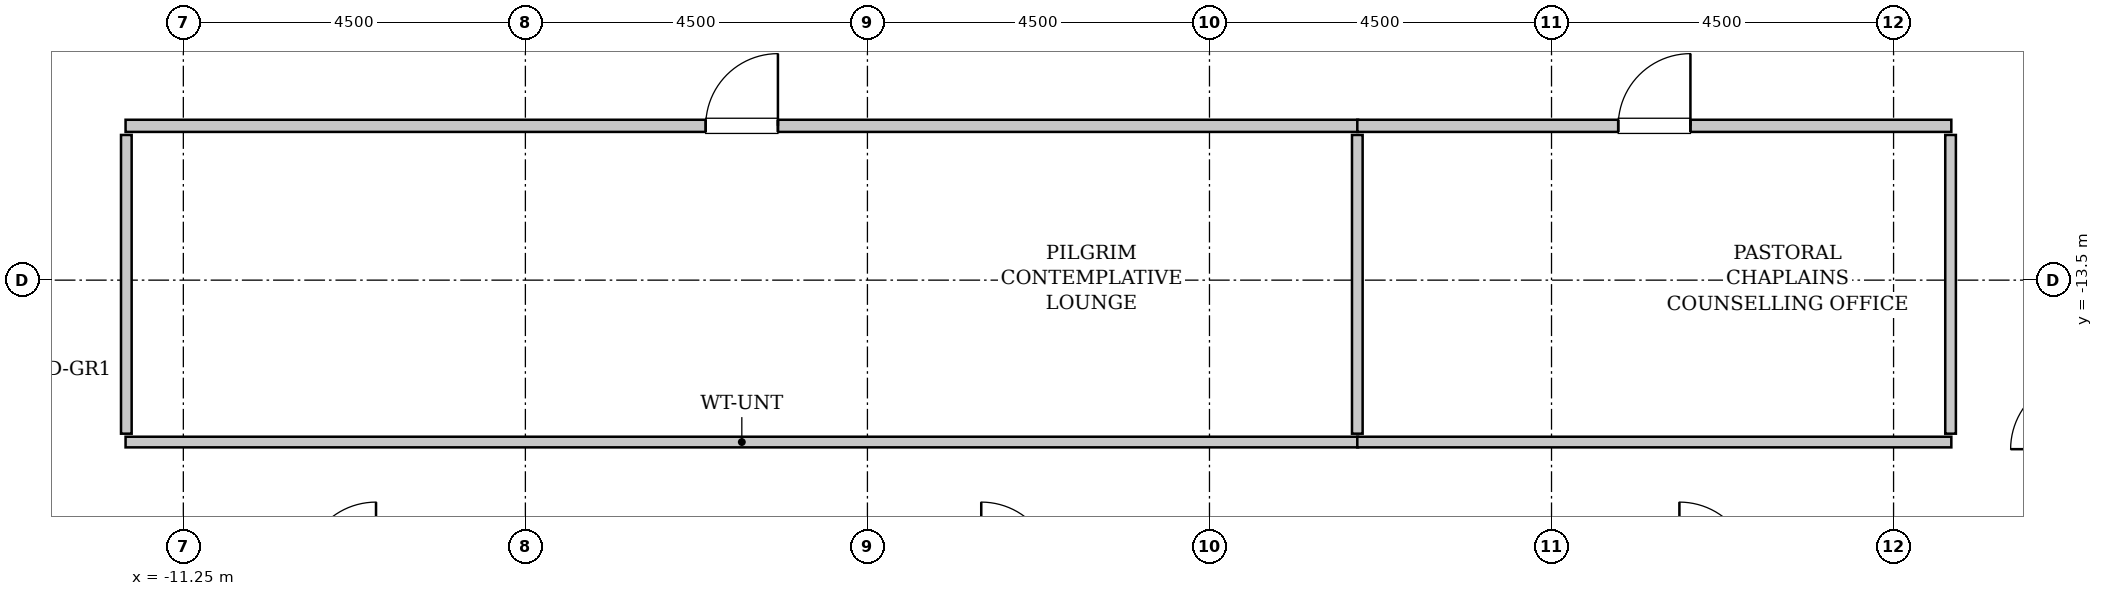
"""IFC4 building model, lengths in metres.
Left out: names, types, materials, properties, quantities, classifications, styles, units other than length and angle.
Written with IfcOpenShell. Run it as: python <this file> out.ifc"""

import sys

from ifc_helpers import new_model, si_unit, direction, frame, frame_2d, origin, place, context, subcontext, project, spatial, rectangle, extrude, source, transform, mapped, element, fill, save


model = new_model("IFC4")
c1 = context("Model", 3, precision=1e-05, world=origin(), true_north=direction((0.0, 1.0)))
c2 = subcontext(c1, "Body", "Model", "MODEL_VIEW")
j1 = project(units=[si_unit("LENGTHUNIT", "METRE"), si_unit("PLANEANGLEUNIT", "RADIAN")], contexts=[c1])
p1 = place(None, origin())
s1 = spatial("IfcSite", under=j1, at=p1, CompositionType="ELEMENT")
p2 = place(p1, origin())
s2 = spatial("IfcBuilding", under=s1, at=p2, CompositionType="ELEMENT")
p3 = place(p2, frame((0.0, 0.0, 225.6)))
s3 = spatial("IfcBuildingStorey", under=s2, at=p3, CompositionType="ELEMENT", Elevation=225.6)
m1 = source(origin(), c2, "Body", "SweptSolid", [
    extrude(rectangle(XDim=16.215, YDim=0.16, at=frame_2d((8.107, 0.0))), origin(), (0.0, 0.0, 1.0), 3.535),
])
p4 = place(p3, frame((-12.01, -11.47, 0.0), z_axis=(0.0, 0.0, 1.0), x_axis=(1.0, 0.0, 0.0)))
e1 = element("IfcWall", 1, at=p4, inside=s3, PredefinedType="PARTITIONING", context=c2, shape_type="MappedRepresentation", body=[
    mapped(m1, transform((0.0, 0.0, 0.0), x_axis=(1.0, 0.0, 0.0), y_axis=(0.0, 1.0, 0.0), z_axis=(0.0, 0.0, 1.0), scale=1.0)),
])
p5 = place(p4, frame((7.633, 0.0, 0.0)))
e2 = element("IfcOpeningElement", 2, at=p5, cuts=e1, PredefinedType="OPENING", context=c2, shape_type="SweptSolid", body=[
    extrude(rectangle(XDim=0.95, YDim=2.1, at=frame_2d((0.475, 1.05))), frame((0.0, 0.09, 0.0), z_axis=(0.0, -1.0, 0.0), x_axis=(1.0, 0.0, 0.0)), (0.0, 0.0, 1.0), 0.18),
])
m2 = source(origin(), c2, "Body", "SweptSolid", [
    extrude(rectangle(XDim=16.215, YDim=0.14, at=frame_2d((8.107, 0.0))), origin(), (0.0, 0.0, 1.0), 3.535),
])
p6 = place(p3, frame((-12.01, -15.63, 0.0), z_axis=(0.0, 0.0, 1.0), x_axis=(1.0, 0.0, 0.0)))
e3 = element("IfcWall", 3, at=p6, inside=s3, PredefinedType="PARTITIONING", context=c2, shape_type="MappedRepresentation", body=[
    mapped(m2, transform((0.0, 0.0, 0.0), x_axis=(1.0, 0.0, 0.0), y_axis=(0.0, 1.0, 0.0), z_axis=(0.0, 0.0, 1.0), scale=1.0)),
])
m3 = source(origin(), c2, "Body", "SweptSolid", [
    extrude(rectangle(XDim=3.93, YDim=0.14, at=frame_2d((1.965, 0.0))), origin(), (0.0, 0.0, 1.0), 3.535),
])
for number, where, z_axis, x_axis in (
    (4, (-12.0, -15.52, 0.0), (0.0, 0.0, 1.0), (0.0, 1.0, 0.0)),
    (5, (4.195, -15.52, 0.0), (0.0, 0.0, 1.0), (0.0, 1.0, 0.0)),
):
    element("IfcWall", number, at=place(p3, frame(where, z_axis=z_axis, x_axis=x_axis)), inside=s3, PredefinedType="PARTITIONING", context=c2, shape_type="MappedRepresentation", body=[
        mapped(m3, transform((0.0, 0.0, 0.0), x_axis=(1.0, 0.0, 0.0), y_axis=(0.0, 1.0, 0.0), z_axis=(0.0, 0.0, 1.0), scale=1.0)),
    ])
m4 = source(origin(), c2, "Body", "SweptSolid", [
    extrude(rectangle(XDim=7.815, YDim=0.16, at=frame_2d((3.907, 0.0))), origin(), (0.0, 0.0, 1.0), 3.535),
])
p7 = place(p3, frame((4.195, -11.47, 0.0), z_axis=(0.0, 0.0, 1.0), x_axis=(1.0, 0.0, 0.0)))
e6 = element("IfcWall", 6, at=p7, inside=s3, PredefinedType="PARTITIONING", context=c2, shape_type="MappedRepresentation", body=[
    mapped(m4, transform((0.0, 0.0, 0.0), x_axis=(1.0, 0.0, 0.0), y_axis=(0.0, 1.0, 0.0), z_axis=(0.0, 0.0, 1.0), scale=1.0)),
])
p8 = place(p7, frame((3.433, 0.0, 0.0)))
e7 = element("IfcOpeningElement", 7, at=p8, cuts=e6, PredefinedType="OPENING", context=c2, shape_type="SweptSolid", body=[
    extrude(rectangle(XDim=0.95, YDim=2.1, at=frame_2d((0.475, 1.05))), frame((0.0, 0.09, 0.0), z_axis=(0.0, -1.0, 0.0), x_axis=(1.0, 0.0, 0.0)), (0.0, 0.0, 1.0), 0.18),
])
m5 = source(origin(), c2, "Body", "SweptSolid", [
    extrude(rectangle(XDim=7.815, YDim=0.14, at=frame_2d((3.907, 0.0))), origin(), (0.0, 0.0, 1.0), 3.535),
])
p9 = place(p3, frame((4.195, -15.63, 0.0), z_axis=(0.0, 0.0, 1.0), x_axis=(1.0, 0.0, 0.0)))
e8 = element("IfcWall", 8, at=p9, inside=s3, PredefinedType="PARTITIONING", context=c2, shape_type="MappedRepresentation", body=[
    mapped(m5, transform((0.0, 0.0, 0.0), x_axis=(1.0, 0.0, 0.0), y_axis=(0.0, 1.0, 0.0), z_axis=(0.0, 0.0, 1.0), scale=1.0)),
])
p10 = place(p3, frame((12.0, -15.52, 0.0), z_axis=(0.0, 0.0, 1.0), x_axis=(0.0, 1.0, 0.0)))
e9 = element("IfcWall", 9, at=p10, inside=s3, PredefinedType="PARTITIONING", context=c2, shape_type="MappedRepresentation", body=[
    mapped(m3, transform((0.0, 0.0, 0.0), x_axis=(1.0, 0.0, 0.0), y_axis=(0.0, 1.0, 0.0), z_axis=(0.0, 0.0, 1.0), scale=1.0)),
])
m6 = source(origin(), c2, "Body", "SweptSolid", [
    extrude(rectangle(XDim=0.95, YDim=2.1, at=frame_2d((0.475, 1.05))), frame((0.0, 0.025, 0.0), z_axis=(0.0, -1.0, 0.0), x_axis=(1.0, 0.0, 0.0)), (0.0, 0.0, 1.0), 0.05),
])
p11 = place(p5, origin())
e10 = element("IfcDoor", 10, at=p11, inside=s3, OperationType="SINGLE_SWING_RIGHT", PredefinedType="DOOR", context=c2, shape_type="MappedRepresentation", body=[
    mapped(m6, transform((0.0, 0.0, 0.0), x_axis=(1.0, 0.0, 0.0), y_axis=(0.0, 1.0, 0.0), z_axis=(0.0, 0.0, 1.0), scale=1.0)),
])
fill(e2, e10)
p12 = place(p8, origin())
e11 = element("IfcDoor", 11, at=p12, inside=s3, OperationType="SINGLE_SWING_RIGHT", PredefinedType="DOOR", context=c2, shape_type="MappedRepresentation", body=[
    mapped(m6, transform((0.0, 0.0, 0.0), x_axis=(1.0, 0.0, 0.0), y_axis=(0.0, 1.0, 0.0), z_axis=(0.0, 0.0, 1.0), scale=1.0)),
])
fill(e7, e11)
save(model, sys.argv[1])
